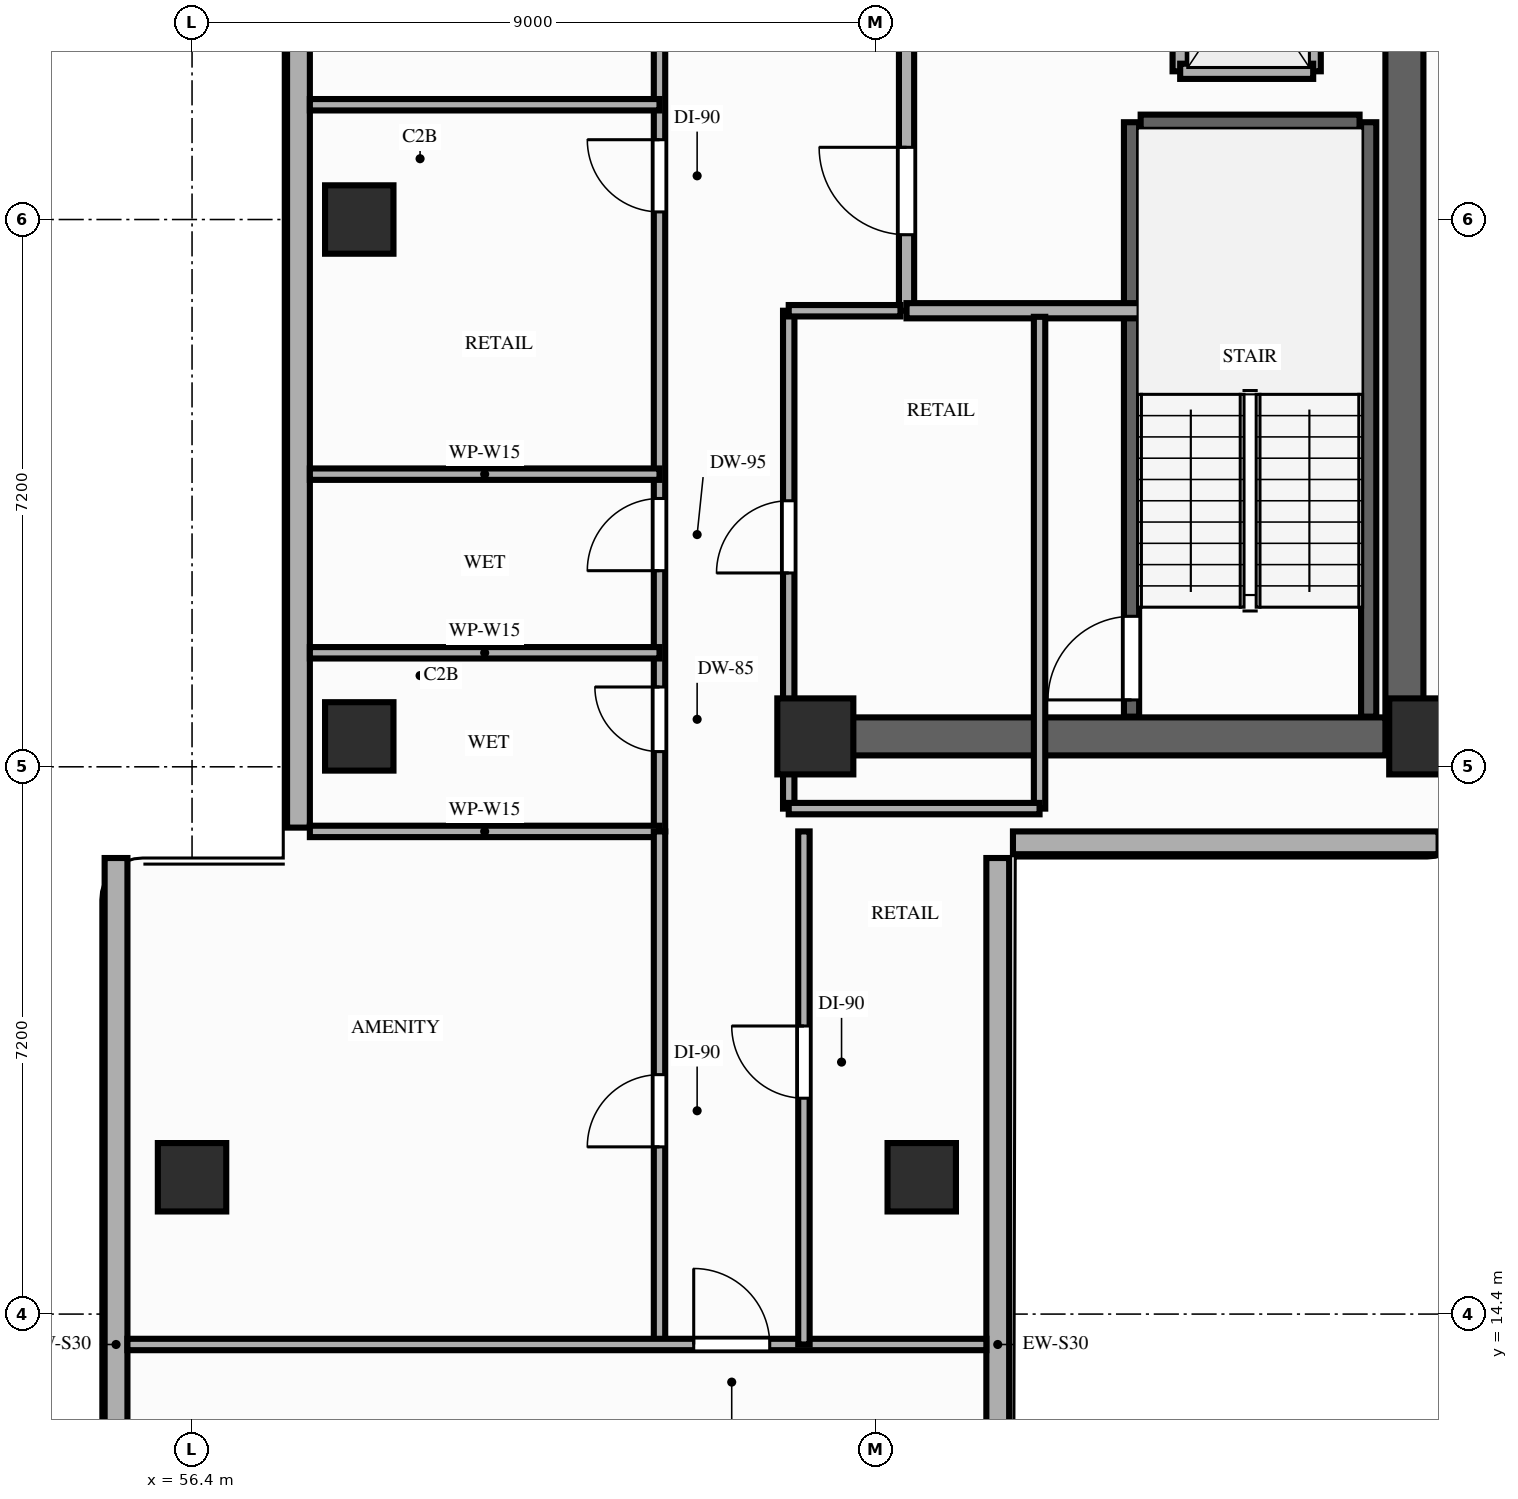
"""IFC4 building model, lengths in metres.
Left out: names, types, materials, properties, quantities, classifications, styles, units other than length and angle.
Written with IfcOpenShell. Run it as: python <this file> out.ifc"""

import sys

from ifc_helpers import new_model, si_unit, direction, frame, frame_2d, origin, origin_2d, place, context, subcontext, project, spatial, rectangle, extrude, element, fill, save


model = new_model("IFC4")
c1 = context("Model", 3, precision=1e-05, world=origin(), true_north=direction((0.0, 1.0)))
c2 = subcontext(c1, "Body", "Model", "MODEL_VIEW")
j1 = project(units=[si_unit("LENGTHUNIT", "METRE"), si_unit("PLANEANGLEUNIT", "RADIAN")], contexts=[c1])
p1 = place(None, origin())
s1 = spatial("IfcSite", under=j1, at=p1, CompositionType="ELEMENT")
p2 = place(p1, origin())
s2 = spatial("IfcBuilding", under=s1, at=p2, CompositionType="ELEMENT")
p3 = place(p2, frame((0.0, 0.0, 75.6)))
s3 = spatial("IfcBuildingStorey", under=s2, at=p3, CompositionType="ELEMENT", Elevation=75.6)
for number, where, z_axis, x_axis in (
    (1, (64.6, 22.0, 0.0), (0.0, 0.0, 1.0), (1.0, 0.0, 0.0)),
    (2, (72.65, 22.0, 0.0), (0.0, 0.0, 1.0), (1.0, 0.0, 0.0)),
):
    element("IfcColumn", number, at=place(p3, frame(where, z_axis=z_axis, x_axis=x_axis)), inside=s3, PredefinedType="COLUMN", context=c2, shape_type="SweptSolid", body=[
        extrude(rectangle(XDim=1.0, YDim=1.0, at=origin_2d()), origin(), (0.0, 0.0, 1.0), 3.8),
    ])
for number, where, z_axis, x_axis in (
    (3, (58.6, 22.0, 0.0), (0.0, 0.0, 1.0), (1.0, 0.0, 0.0)),
    (4, (58.6, 28.8, 0.0), (0.0, 0.0, 1.0), (1.0, 0.0, 0.0)),
    (5, (56.4, 16.2, 0.0), (0.0, 0.0, 1.0), (1.0, 0.0, 0.0)),
    (6, (66.0, 16.2, 0.0), (0.0, 0.0, 1.0), (1.0, 0.0, 0.0)),
):
    element("IfcColumn", number, at=place(p3, frame(where, z_axis=z_axis, x_axis=x_axis)), inside=s3, PredefinedType="COLUMN", context=c2, shape_type="SweptSolid", body=[
        extrude(rectangle(XDim=0.9, YDim=0.9, at=origin_2d()), origin(), (0.0, 0.0, 1.0), 3.8),
    ])
p4 = place(p3, frame((57.8, 43.4, 0.0), z_axis=(0.0, 0.0, 1.0), x_axis=(0.0, -1.0, 0.0)))
e7 = element("IfcWall", 7, at=p4, inside=s3, PredefinedType="STANDARD", context=c2, shape_type="SweptSolid", body=[
    extrude(rectangle(XDim=22.6, YDim=0.3, at=frame_2d((11.3, 0.0))), origin(), (0.0, 0.0, 1.0), 3.14),
])
p5 = place(p4, frame((3.7, 0.0, 0.0)))
e8 = element("IfcOpeningElement", 8, at=p5, cuts=e7, PredefinedType="OPENING", context=c2, shape_type="SweptSolid", body=[
    extrude(rectangle(XDim=1.4, YDim=2.1, at=frame_2d((0.7, 1.05))), frame((0.0, 0.16, 0.0), z_axis=(0.0, -1.0, 0.0), x_axis=(1.0, 0.0, 0.0)), (0.0, 0.0, 1.0), 0.32),
])
p6 = place(p4, frame((10.3, 0.0, 0.85)))
e9 = element("IfcOpeningElement", 9, at=p6, cuts=e7, PredefinedType="OPENING", context=c2, shape_type="SweptSolid", body=[
    extrude(rectangle(XDim=1.6, YDim=1.7, at=frame_2d((0.8, 0.85))), frame((0.0, 0.16, 0.0), z_axis=(0.0, -1.0, 0.0), x_axis=(1.0, 0.0, 0.0)), (0.0, 0.0, 1.0), 0.32),
])
for number, where, z_axis, x_axis in (
    (10, (55.4, 20.4, 0.0), (0.0, 0.0, 1.0), (0.0, -1.0, 0.0)),
    (11, (67.0, 7.6, 0.0), (0.0, 0.0, 1.0), (0.0, 1.0, 0.0)),
):
    element("IfcWall", number, at=place(p3, frame(where, z_axis=z_axis, x_axis=x_axis)), inside=s3, PredefinedType="STANDARD", context=c2, shape_type="SweptSolid", body=[
        extrude(rectangle(XDim=12.8, YDim=0.3, at=frame_2d((6.4, 0.0))), origin(), (0.0, 0.0, 1.0), 3.56),
    ])
p7 = place(p3, frame((67.2, 20.6, 0.0), z_axis=(0.0, 0.0, 1.0), x_axis=(1.0, 0.0, 0.0)))
e12 = element("IfcWall", 12, at=p7, inside=s3, PredefinedType="STANDARD", context=c2, shape_type="SweptSolid", body=[
    extrude(rectangle(XDim=5.6, YDim=0.3, at=frame_2d((2.8, 0.0))), origin(), (0.0, 0.0, 1.0), 3.56),
])
p8 = place(p3, frame((72.35, 22.0, 0.0), z_axis=(0.0, 0.0, 1.0), x_axis=(0.0, 1.0, 0.0)))
e13 = element("IfcWall", 13, at=p8, inside=s3, PredefinedType="SHEAR", context=c2, shape_type="SweptSolid", body=[
    extrude(rectangle(XDim=20.25, YDim=0.5, at=frame_2d((10.125, 0.0))), origin(), (0.0, 0.0, 1.0), 3.56),
])
p9 = place(p3, frame((64.6, 22.0, 0.0), z_axis=(0.0, 0.0, 1.0), x_axis=(1.0, 0.0, 0.0)))
e14 = element("IfcWall", 14, at=p9, inside=s3, PredefinedType="SHEAR", context=c2, shape_type="SweptSolid", body=[
    extrude(rectangle(XDim=7.5, YDim=0.5, at=frame_2d((3.75, 0.0))), origin(), (0.0, 0.0, 1.0), 3.56),
])
p10 = place(p3, frame((68.76, 22.26, 0.0), z_axis=(0.0, 0.0, 1.0), x_axis=(0.0, 1.0, 0.0)))
e15 = element("IfcWall", 15, at=p10, inside=s3, PredefinedType="SHEAR", context=c2, shape_type="SweptSolid", body=[
    extrude(rectangle(XDim=7.82, YDim=0.2, at=frame_2d((3.91, 0.0))), origin(), (0.0, 0.0, 1.0), 3.56),
])
p11 = place(p10, frame((0.22, 0.0, 0.0)))
e16 = element("IfcOpeningElement", 16, at=p11, cuts=e15, PredefinedType="OPENING", context=c2, shape_type="SweptSolid", body=[
    extrude(rectangle(XDim=1.1, YDim=2.15, at=frame_2d((0.55, 1.075))), frame((0.0, 0.11, 0.0), z_axis=(0.0, -1.0, 0.0), x_axis=(1.0, 0.0, 0.0)), (0.0, 0.0, 1.0), 0.22),
])
p12 = place(p3, frame((71.88, 22.26, 0.0), z_axis=(0.0, 0.0, 1.0), x_axis=(0.0, 1.0, 0.0)))
e17 = element("IfcWall", 17, at=p12, inside=s3, PredefinedType="SHEAR", context=c2, shape_type="SweptSolid", body=[
    extrude(rectangle(XDim=7.82, YDim=0.2, at=frame_2d((3.91, 0.0))), origin(), (0.0, 0.0, 1.0), 3.56),
])
p13 = place(p3, frame((68.88, 30.08, 0.0), z_axis=(0.0, 0.0, 1.0), x_axis=(1.0, 0.0, 0.0)))
e18 = element("IfcWall", 18, at=p13, inside=s3, PredefinedType="SHEAR", context=c2, shape_type="SweptSolid", body=[
    extrude(rectangle(XDim=2.88, YDim=0.2, at=frame_2d((1.44, 0.0))), origin(), (0.0, 0.0, 1.0), 3.56),
])
p14 = place(p3, frame((69.4, 30.75, 0.0), z_axis=(0.0, 0.0, 1.0), x_axis=(0.0, 1.0, 0.0)))
e19 = element("IfcWall", 19, at=p14, inside=s3, PredefinedType="MOVABLE", context=c2, shape_type="SweptSolid", body=[
    extrude(rectangle(XDim=2.45, YDim=0.2, at=frame_2d((1.225, 0.0))), origin(), (0.0, 0.0, 1.0), 3.56),
])
p15 = place(p14, frame((0.65, 0.0, 0.0)))
e20 = element("IfcOpeningElement", 20, at=p15, cuts=e19, PredefinedType="OPENING", context=c2, shape_type="SweptSolid", body=[
    extrude(rectangle(XDim=1.05, YDim=2.15, at=frame_2d((0.525, 1.075))), frame((0.0, 0.11, 0.0), z_axis=(0.0, -1.0, 0.0), x_axis=(1.0, 0.0, 0.0)), (0.0, 0.0, 1.0), 0.22),
])
p16 = place(p3, frame((71.15, 30.75, 0.0), z_axis=(0.0, 0.0, 1.0), x_axis=(0.0, 1.0, 0.0)))
e21 = element("IfcWall", 21, at=p16, inside=s3, PredefinedType="MOVABLE", context=c2, shape_type="SweptSolid", body=[
    extrude(rectangle(XDim=2.45, YDim=0.2, at=frame_2d((1.225, 0.0))), origin(), (0.0, 0.0, 1.0), 3.56),
])
p17 = place(p3, frame((69.4, 30.75, 0.0), z_axis=(0.0, 0.0, 1.0), x_axis=(1.0, 0.0, 0.0)))
e22 = element("IfcWall", 22, at=p17, inside=s3, PredefinedType="MOVABLE", context=c2, shape_type="SweptSolid", body=[
    extrude(rectangle(XDim=1.75, YDim=0.2, at=frame_2d((0.875, 0.0))), origin(), (0.0, 0.0, 1.0), 3.56),
])
p18 = place(p3, frame((65.8, 27.6, 0.0), z_axis=(0.0, 0.0, 1.0), x_axis=(0.0, 1.0, 0.0)))
e23 = element("IfcWall", 23, at=p18, inside=s3, PredefinedType="PARTITIONING", context=c2, shape_type="SweptSolid", body=[
    extrude(rectangle(XDim=5.5, YDim=0.2, at=frame_2d((2.75, 0.0))), origin(), (0.0, 0.0, 1.0), 3.56),
])
p19 = place(p18, frame((1.0, 0.0, 0.0)))
e24 = element("IfcOpeningElement", 24, at=p19, cuts=e23, PredefinedType="OPENING", context=c2, shape_type="SweptSolid", body=[
    extrude(rectangle(XDim=1.15, YDim=2.15, at=frame_2d((0.575, 1.075))), frame((0.0, 0.11, 0.0), z_axis=(0.0, -1.0, 0.0), x_axis=(1.0, 0.0, 0.0)), (0.0, 0.0, 1.0), 0.22),
])
p20 = place(p3, frame((65.8, 27.6, 0.0), z_axis=(0.0, 0.0, 1.0), x_axis=(1.0, 0.0, 0.0)))
e25 = element("IfcWall", 25, at=p20, inside=s3, PredefinedType="PARTITIONING", context=c2, shape_type="SweptSolid", body=[
    extrude(rectangle(XDim=3.4, YDim=0.2, at=frame_2d((1.7, 0.0))), origin(), (0.0, 0.0, 1.0), 3.56),
])
p21 = place(p3, frame((64.25, 21.05, 0.0), z_axis=(0.0, 0.0, 1.0), x_axis=(0.0, 1.0, 0.0)))
e26 = element("IfcWall", 26, at=p21, inside=s3, PredefinedType="PARTITIONING", context=c2, shape_type="SweptSolid", body=[
    extrude(rectangle(XDim=6.55, YDim=0.15, at=frame_2d((3.275, 0.0))), origin(), (0.0, 0.0, 1.0), 3.14),
])
p22 = place(p21, frame((3.1, 0.0, 0.0)))
e27 = element("IfcOpeningElement", 27, at=p22, cuts=e26, PredefinedType="OPENING", context=c2, shape_type="SweptSolid", body=[
    extrude(rectangle(XDim=0.95, YDim=2.15, at=frame_2d((0.475, 1.075))), frame((0.0, 0.085, 0.0), z_axis=(0.0, -1.0, 0.0), x_axis=(1.0, 0.0, 0.0)), (0.0, 0.0, 1.0), 0.17),
])
p23 = place(p3, frame((67.55, 21.05, 0.0), z_axis=(0.0, 0.0, 1.0), x_axis=(0.0, 1.0, 0.0)))
e28 = element("IfcWall", 28, at=p23, inside=s3, PredefinedType="PARTITIONING", context=c2, shape_type="SweptSolid", body=[
    extrude(rectangle(XDim=6.47, YDim=0.15, at=frame_2d((3.235, 0.0))), origin(), (0.0, 0.0, 1.0), 3.14),
])
p24 = place(p3, frame((64.25, 21.05, 0.0), z_axis=(0.0, 0.0, 1.0), x_axis=(1.0, 0.0, 0.0)))
e29 = element("IfcWall", 29, at=p24, inside=s3, PredefinedType="PARTITIONING", context=c2, shape_type="SweptSolid", body=[
    extrude(rectangle(XDim=3.3, YDim=0.15, at=frame_2d((1.65, 0.0))), origin(), (0.0, 0.0, 1.0), 3.14),
])
p25 = place(p3, frame((64.25, 27.6, 0.0), z_axis=(0.0, 0.0, 1.0), x_axis=(1.0, 0.0, 0.0)))
e30 = element("IfcWall", 30, at=p25, inside=s3, PredefinedType="PARTITIONING", context=c2, shape_type="SweptSolid", body=[
    extrude(rectangle(XDim=1.47, YDim=0.15, at=frame_2d((0.735, 0.0))), origin(), (0.0, 0.0, 1.0), 3.14),
])
p26 = place(p3, frame((62.55, 20.75, 0.0), z_axis=(0.0, 0.0, 1.0), x_axis=(0.0, 1.0, 0.0)))
e31 = element("IfcWall", 31, at=p26, inside=s3, PredefinedType="PARTITIONING", context=c2, shape_type="SweptSolid", body=[
    extrude(rectangle(XDim=22.7, YDim=0.15, at=frame_2d((11.35, 0.0))), origin(), (0.0, 0.0, 1.0), 3.14),
])
p27 = place(p26, frame((1.05, 0.0, 0.0)))
e32 = element("IfcOpeningElement", 32, at=p27, cuts=e31, PredefinedType="OPENING", context=c2, shape_type="SweptSolid", body=[
    extrude(rectangle(XDim=0.85, YDim=2.1, at=frame_2d((0.425, 1.05))), frame((0.0, 0.085, 0.0), z_axis=(0.0, -1.0, 0.0), x_axis=(1.0, 0.0, 0.0)), (0.0, 0.0, 1.0), 0.17),
])
p28 = place(p26, frame((3.43, 0.0, 0.0)))
e33 = element("IfcOpeningElement", 33, at=p28, cuts=e31, PredefinedType="OPENING", context=c2, shape_type="SweptSolid", body=[
    extrude(rectangle(XDim=0.95, YDim=2.1, at=frame_2d((0.475, 1.05))), frame((0.0, 0.085, 0.0), z_axis=(0.0, -1.0, 0.0), x_axis=(1.0, 0.0, 0.0)), (0.0, 0.0, 1.0), 0.17),
])
p29 = place(p26, frame((8.15, 0.0, 0.0)))
e34 = element("IfcOpeningElement", 34, at=p29, cuts=e31, PredefinedType="OPENING", context=c2, shape_type="SweptSolid", body=[
    extrude(rectangle(XDim=0.95, YDim=2.15, at=frame_2d((0.475, 1.075))), frame((0.0, 0.085, 0.0), z_axis=(0.0, -1.0, 0.0), x_axis=(1.0, 0.0, 0.0)), (0.0, 0.0, 1.0), 0.17),
])
p30 = place(p26, frame((12.14, 0.0, 0.0)))
e35 = element("IfcOpeningElement", 35, at=p30, cuts=e31, PredefinedType="OPENING", context=c2, shape_type="SweptSolid", body=[
    extrude(rectangle(XDim=0.95, YDim=2.15, at=frame_2d((0.475, 1.075))), frame((0.0, 0.085, 0.0), z_axis=(0.0, -1.0, 0.0), x_axis=(1.0, 0.0, 0.0)), (0.0, 0.0, 1.0), 0.17),
])
p31 = place(p26, frame((18.71, 0.0, 0.0)))
e36 = element("IfcOpeningElement", 36, at=p31, cuts=e31, PredefinedType="OPENING", context=c2, shape_type="SweptSolid", body=[
    extrude(rectangle(XDim=0.95, YDim=2.15, at=frame_2d((0.475, 1.075))), frame((0.0, 0.085, 0.0), z_axis=(0.0, -1.0, 0.0), x_axis=(1.0, 0.0, 0.0)), (0.0, 0.0, 1.0), 0.17),
])
for number, where, z_axis, x_axis in (
    (37, (57.95, 20.75, 0.0), (0.0, 0.0, 1.0), (1.0, 0.0, 0.0)),
    (38, (57.95, 23.1, 0.0), (0.0, 0.0, 1.0), (1.0, 0.0, 0.0)),
    (39, (57.95, 25.45, 0.0), (0.0, 0.0, 1.0), (1.0, 0.0, 0.0)),
    (40, (57.95, 30.31, 0.0), (0.0, 0.0, 1.0), (1.0, 0.0, 0.0)),
):
    element("IfcWall", number, at=place(p3, frame(where, z_axis=z_axis, x_axis=x_axis)), inside=s3, PredefinedType="PARTITIONING", context=c2, shape_type="SweptSolid", body=[
        extrude(rectangle(XDim=4.6, YDim=0.15, at=frame_2d((2.3, 0.0))), origin(), (0.0, 0.0, 1.0), 3.14),
    ])
p32 = place(p3, frame((62.55, 14.0, 0.0), z_axis=(0.0, 0.0, 1.0), x_axis=(0.0, 1.0, 0.0)))
e41 = element("IfcWall", 41, at=p32, inside=s3, PredefinedType="PARTITIONING", context=c2, shape_type="SweptSolid", body=[
    extrude(rectangle(XDim=6.75, YDim=0.15, at=frame_2d((3.375, 0.0))), origin(), (0.0, 0.0, 1.0), 3.14),
])
p33 = place(p32, frame((2.6, 0.0, 0.0)))
e42 = element("IfcOpeningElement", 42, at=p33, cuts=e41, PredefinedType="OPENING", context=c2, shape_type="SweptSolid", body=[
    extrude(rectangle(XDim=0.95, YDim=2.15, at=frame_2d((0.475, 1.075))), frame((0.0, 0.085, 0.0), z_axis=(0.0, -1.0, 0.0), x_axis=(1.0, 0.0, 0.0)), (0.0, 0.0, 1.0), 0.17),
])
p34 = place(p3, frame((55.55, 14.0, 0.0), z_axis=(0.0, 0.0, 1.0), x_axis=(1.0, 0.0, 0.0)))
e43 = element("IfcWall", 43, at=p34, inside=s3, PredefinedType="PARTITIONING", context=c2, shape_type="SweptSolid", body=[
    extrude(rectangle(XDim=11.3, YDim=0.15, at=frame_2d((5.65, 0.0))), origin(), (0.0, 0.0, 1.0), 3.14),
])
p35 = place(p34, frame((7.45, 0.0, 0.0)))
e44 = element("IfcOpeningElement", 44, at=p35, cuts=e43, PredefinedType="OPENING", context=c2, shape_type="SweptSolid", body=[
    extrude(rectangle(XDim=1.0, YDim=2.15, at=frame_2d((0.5, 1.075))), frame((0.0, 0.085, 0.0), z_axis=(0.0, -1.0, 0.0), x_axis=(1.0, 0.0, 0.0)), (0.0, 0.0, 1.0), 0.17),
])
p36 = place(p3, frame((64.45, 14.0, 0.0), z_axis=(0.0, 0.0, 1.0), x_axis=(0.0, 1.0, 0.0)))
e45 = element("IfcWall", 45, at=p36, inside=s3, PredefinedType="PARTITIONING", context=c2, shape_type="SweptSolid", body=[
    extrude(rectangle(XDim=6.75, YDim=0.15, at=frame_2d((3.375, 0.0))), origin(), (0.0, 0.0, 1.0), 3.14),
])
p37 = place(p36, frame((3.24, 0.0, 0.0)))
e46 = element("IfcOpeningElement", 46, at=p37, cuts=e45, PredefinedType="OPENING", context=c2, shape_type="SweptSolid", body=[
    extrude(rectangle(XDim=0.95, YDim=2.15, at=frame_2d((0.475, 1.075))), frame((0.0, 0.085, 0.0), z_axis=(0.0, -1.0, 0.0), x_axis=(1.0, 0.0, 0.0)), (0.0, 0.0, 1.0), 0.17),
])
p38 = place(p11, origin())
e47 = element("IfcDoor", 47, at=p38, inside=s3, OperationType="SINGLE_SWING_LEFT", PredefinedType="DOOR", context=c2, shape_type="SweptSolid", body=[
    extrude(rectangle(XDim=1.1, YDim=2.15, at=frame_2d((0.55, 1.075))), frame((0.0, 0.025, 0.0), z_axis=(0.0, -1.0, 0.0), x_axis=(1.0, 0.0, 0.0)), (0.0, 0.0, 1.0), 0.05),
])
fill(e16, e47)
p39 = place(p19, origin())
e48 = element("IfcDoor", 48, at=p39, inside=s3, OperationType="SINGLE_SWING_RIGHT", PredefinedType="DOOR", context=c2, shape_type="SweptSolid", body=[
    extrude(rectangle(XDim=1.15, YDim=2.15, at=frame_2d((0.575, 1.075))), frame((0.0, 0.025, 0.0), z_axis=(0.0, -1.0, 0.0), x_axis=(1.0, 0.0, 0.0)), (0.0, 0.0, 1.0), 0.05),
])
fill(e24, e48)
p40 = place(p22, origin())
e49 = element("IfcDoor", 49, at=p40, inside=s3, OperationType="SINGLE_SWING_LEFT", PredefinedType="DOOR", context=c2, shape_type="SweptSolid", body=[
    extrude(rectangle(XDim=0.95, YDim=2.15, at=frame_2d((0.475, 1.075))), frame((0.0, 0.025, 0.0), z_axis=(0.0, -1.0, 0.0), x_axis=(1.0, 0.0, 0.0)), (0.0, 0.0, 1.0), 0.05),
])
fill(e27, e49)
p41 = place(p27, origin())
e50 = element("IfcDoor", 50, at=p41, inside=s3, OperationType="SINGLE_SWING_RIGHT", PredefinedType="DOOR", context=c2, shape_type="SweptSolid", body=[
    extrude(rectangle(XDim=0.85, YDim=2.1, at=frame_2d((0.425, 1.05))), frame((0.0, 0.025, 0.0), z_axis=(0.0, -1.0, 0.0), x_axis=(1.0, 0.0, 0.0)), (0.0, 0.0, 1.0), 0.05),
])
fill(e32, e50)
p42 = place(p28, origin())
e51 = element("IfcDoor", 51, at=p42, inside=s3, OperationType="SINGLE_SWING_LEFT", PredefinedType="DOOR", context=c2, shape_type="SweptSolid", body=[
    extrude(rectangle(XDim=0.95, YDim=2.1, at=frame_2d((0.475, 1.05))), frame((0.0, 0.025, 0.0), z_axis=(0.0, -1.0, 0.0), x_axis=(1.0, 0.0, 0.0)), (0.0, 0.0, 1.0), 0.05),
])
fill(e33, e51)
p43 = place(p29, origin())
e52 = element("IfcDoor", 52, at=p43, inside=s3, OperationType="SINGLE_SWING_RIGHT", PredefinedType="DOOR", context=c2, shape_type="SweptSolid", body=[
    extrude(rectangle(XDim=0.95, YDim=2.15, at=frame_2d((0.475, 1.075))), frame((0.0, 0.025, 0.0), z_axis=(0.0, -1.0, 0.0), x_axis=(1.0, 0.0, 0.0)), (0.0, 0.0, 1.0), 0.05),
])
fill(e34, e52)
p44 = place(p33, origin())
e53 = element("IfcDoor", 53, at=p44, inside=s3, OperationType="SINGLE_SWING_LEFT", PredefinedType="DOOR", context=c2, shape_type="SweptSolid", body=[
    extrude(rectangle(XDim=0.95, YDim=2.15, at=frame_2d((0.475, 1.075))), frame((0.0, 0.025, 0.0), z_axis=(0.0, -1.0, 0.0), x_axis=(1.0, 0.0, 0.0)), (0.0, 0.0, 1.0), 0.05),
])
fill(e42, e53)
p45 = place(p37, origin())
e54 = element("IfcDoor", 54, at=p45, inside=s3, OperationType="SINGLE_SWING_RIGHT", PredefinedType="DOOR", context=c2, shape_type="SweptSolid", body=[
    extrude(rectangle(XDim=0.95, YDim=2.15, at=frame_2d((0.475, 1.075))), frame((0.0, 0.025, 0.0), z_axis=(0.0, -1.0, 0.0), x_axis=(1.0, 0.0, 0.0)), (0.0, 0.0, 1.0), 0.05),
])
fill(e46, e54)
p46 = place(p35, origin())
e55 = element("IfcDoor", 55, at=p46, inside=s3, OperationType="SINGLE_SWING_LEFT", PredefinedType="DOOR", context=c2, shape_type="SweptSolid", body=[
    extrude(rectangle(XDim=1.0, YDim=2.15, at=frame_2d((0.5, 1.075))), frame((0.0, 0.025, 0.0), z_axis=(0.0, -1.0, 0.0), x_axis=(1.0, 0.0, 0.0)), (0.0, 0.0, 1.0), 0.05),
])
fill(e44, e55)
save(model, sys.argv[1])
